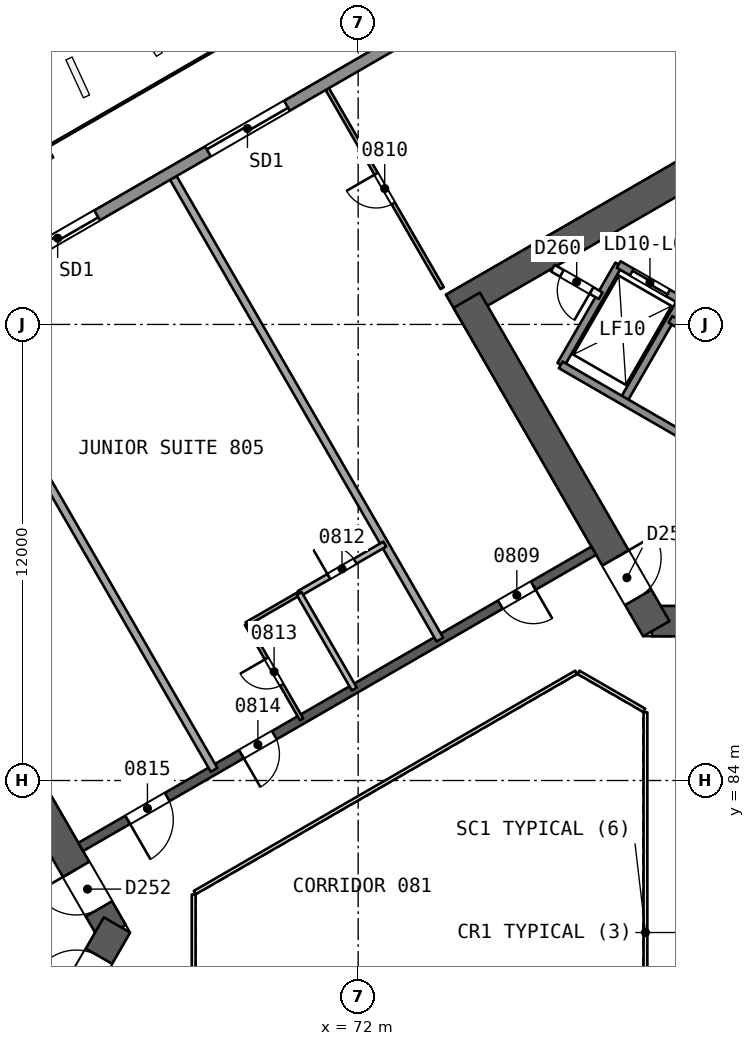
"""IFC4 building model, lengths in metres.
Left out: names, types, materials, properties, quantities, classifications, styles, units other than length and angle.
Written with IfcOpenShell. Run it as: python <this file> out.ifc"""

import sys

from ifc_helpers import new_model, si_unit, direction, frame, frame_2d, origin, origin_2d, place, context, subcontext, project, spatial, rectangle, extrude, element, fill, save


model = new_model("IFC4")
c1 = context("Model", 3, precision=1e-05, world=origin(), true_north=direction((0.0, 1.0)))
c2 = subcontext(c1, "Body", "Model", "MODEL_VIEW")
j1 = project(units=[si_unit("LENGTHUNIT", "METRE"), si_unit("PLANEANGLEUNIT", "RADIAN")], contexts=[c1])
p1 = place(None, origin())
s1 = spatial("IfcSite", under=j1, at=p1, CompositionType="ELEMENT")
p2 = place(p1, origin())
s2 = spatial("IfcBuilding", under=s1, at=p2, CompositionType="ELEMENT")
p3 = place(p2, frame((0.0, 0.0, 41.1)))
s3 = spatial("IfcBuildingStorey", under=s2, at=p3, CompositionType="ELEMENT", Elevation=41.1)
p4 = place(p3, frame((65.538, 80.0, 0.0), z_axis=(0.0, 0.0, 1.0), x_axis=(-0.49999662545, 0.866027352073, 0.0)))
e1 = element("IfcWall", 1, at=p4, inside=s3, PredefinedType="SHEAR", context=c2, shape_type="SweptSolid", body=[
    extrude(rectangle(XDim=10.149, YDim=0.8, at=frame_2d((5.074, 0.0))), origin(), (0.0, 0.0, 1.0), 3.7),
])
p5 = place(p4, frame((0.719, 0.0, 0.0)))
e2 = element("IfcOpeningElement", 2, at=p5, cuts=e1, PredefinedType="OPENING", context=c2, shape_type="SweptSolid", body=[
    extrude(rectangle(XDim=1.2, YDim=2.1, at=frame_2d((0.6, 1.05))), frame((0.0, 0.411, 0.0), z_axis=(0.0, -1.0, 0.0), x_axis=(1.0, 0.0, 0.0)), (0.0, 0.0, 1.0), 0.821),
])
p6 = place(p3, frame((60.664, 71.557, 0.0), z_axis=(0.0, 0.0, 1.0), x_axis=(0.50000409368, 0.866023040284, 0.0)))
e3 = element("IfcWall", 3, at=p6, inside=s3, PredefinedType="SHEAR", context=c2, shape_type="SweptSolid", body=[
    extrude(rectangle(XDim=9.98, YDim=0.8, at=frame_2d((4.99, 0.0))), origin(), (0.0, 0.0, 1.0), 3.7),
])
p7 = place(p6, frame((7.83, 0.0, 0.0)))
e4 = element("IfcOpeningElement", 4, at=p7, cuts=e3, PredefinedType="OPENING", context=c2, shape_type="SweptSolid", body=[
    extrude(rectangle(XDim=1.2, YDim=2.1, at=frame_2d((0.6, 1.05))), frame((0.0, 0.411, 0.0), z_axis=(0.0, -1.0, 0.0), x_axis=(1.0, 0.0, 0.0)), (0.0, 0.0, 1.0), 0.821),
])
p8 = place(p3, frame((79.731, 88.194, 0.0), z_axis=(0.0, 0.0, 1.0), x_axis=(1.0, 0.0, 0.0)))
e5 = element("IfcWall", 5, at=p8, inside=s3, PredefinedType="SHEAR", context=c2, shape_type="SweptSolid", body=[
    extrude(rectangle(XDim=10.149, YDim=0.8, at=frame_2d((5.074, 0.0))), origin(), (0.0, 0.0, 1.0), 3.7),
])
p9 = place(p8, frame((0.719, 0.0, 0.0)))
e6 = element("IfcOpeningElement", 6, at=p9, cuts=e5, PredefinedType="OPENING", context=c2, shape_type="SweptSolid", body=[
    extrude(rectangle(XDim=1.2, YDim=2.1, at=frame_2d((0.6, 1.05))), frame((0.0, 0.411, 0.0), z_axis=(0.0, -1.0, 0.0), x_axis=(1.0, 0.0, 0.0)), (0.0, 0.0, 1.0), 0.821),
])
p10 = place(p3, frame((86.723, 103.488, 0.0), z_axis=(0.0, 0.0, 1.0), x_axis=(-0.866032504327, -0.499987701298, 0.0)))
e7 = element("IfcWall", 7, at=p10, inside=s3, PredefinedType="SHEAR", context=c2, shape_type="SweptSolid", body=[
    extrude(rectangle(XDim=14.102, YDim=0.8, at=frame_2d((7.051, 0.0))), origin(), (0.0, 0.0, 1.0), 3.7),
])
p11 = place(p3, frame((74.856, 96.637, 0.0), z_axis=(0.0, 0.0, 1.0), x_axis=(0.499993500917, -0.866029155999, 0.0)))
e8 = element("IfcWall", 8, at=p11, inside=s3, PredefinedType="SHEAR", context=c2, shape_type="SweptSolid", body=[
    extrude(rectangle(XDim=9.98, YDim=0.8, at=frame_2d((4.99, 0.0))), origin(), (0.0, 0.0, 1.0), 3.7),
])
p12 = place(p11, frame((7.83, 0.0, 0.0)))
e9 = element("IfcOpeningElement", 9, at=p12, cuts=e8, PredefinedType="OPENING", context=c2, shape_type="SweptSolid", body=[
    extrude(rectangle(XDim=1.2, YDim=2.1, at=frame_2d((0.6, 1.05))), frame((0.0, 0.411, 0.0), z_axis=(0.0, -1.0, 0.0), x_axis=(1.0, 0.0, 0.0)), (0.0, 0.0, 1.0), 0.821),
])
p13 = place(p3, frame((78.2, 90.046, 0.0), z_axis=(0.0, 0.0, 1.0), x_axis=(-0.866026492143, -0.499998114903, 0.0)))
e10 = element("IfcWall", 10, at=p13, inside=s3, PredefinedType="SHEAR", context=c2, shape_type="SweptSolid", body=[
    extrude(rectangle(XDim=15.588, YDim=0.25, at=frame_2d((7.794, 0.0))), origin(), (0.0, 0.0, 1.0), 3.2),
])
p14 = place(p13, frame((1.838, 0.0, 0.0)))
e11 = element("IfcOpeningElement", 11, at=p14, cuts=e10, PredefinedType="OPENING", context=c2, shape_type="SweptSolid", body=[
    extrude(rectangle(XDim=1.0, YDim=2.1, at=frame_2d((0.5, 1.05))), frame((0.0, 0.135, 0.0), z_axis=(0.0, -1.0, 0.0), x_axis=(1.0, 0.0, 0.0)), (0.0, 0.0, 1.0), 0.271),
])
p15 = place(p13, frame((9.706, 0.0, 0.0)))
e12 = element("IfcOpeningElement", 12, at=p15, cuts=e10, PredefinedType="OPENING", context=c2, shape_type="SweptSolid", body=[
    extrude(rectangle(XDim=1.0, YDim=2.1, at=frame_2d((0.5, 1.05))), frame((0.0, 0.135, 0.0), z_axis=(0.0, -1.0, 0.0), x_axis=(1.0, 0.0, 0.0)), (0.0, 0.0, 1.0), 0.271),
])
p16 = place(p13, frame((12.962, 0.0, 0.0)))
e13 = element("IfcOpeningElement", 13, at=p16, cuts=e10, PredefinedType="OPENING", context=c2, shape_type="SweptSolid", body=[
    extrude(rectangle(XDim=1.2, YDim=2.4, at=frame_2d((0.6, 1.2))), frame((0.0, 0.135, 0.0), z_axis=(0.0, -1.0, 0.0), x_axis=(1.0, 0.0, 0.0)), (0.0, 0.0, 1.0), 0.271),
])
p17 = place(p3, frame((63.087, 100.634, 0.0), z_axis=(0.010093620709, -0.017482414954, 0.999796221231), x_axis=(0.866020200589, 0.50000901209, 8.5616e-08)))
e14 = element("IfcColumn", 14, at=p17, inside=s3, PredefinedType="COLUMN", context=c2, shape_type="SweptSolid", body=[
    extrude(rectangle(XDim=1.2, YDim=1.2, at=origin_2d()), origin(), (0.0, 0.0, 1.0), 3.701),
])
p18 = place(p3, frame((74.21, 96.956, 0.0), z_axis=(0.0, 0.0, 1.0), x_axis=(-0.499985689571, 0.866033665757, 0.0)))
e15 = element("IfcWall", 15, at=p18, inside=s3, PredefinedType="PARTITIONING", context=c2, shape_type="SweptSolid", body=[
    extrude(rectangle(XDim=6.048, YDim=0.1, at=frame_2d((3.024, 0.0))), origin(), (0.0, 0.0, 1.0), 3.2),
])
p19 = place(p18, frame((2.574, 0.0, 0.0)))
e16 = element("IfcOpeningElement", 16, at=p19, cuts=e15, PredefinedType="OPENING", context=c2, shape_type="SweptSolid", body=[
    extrude(rectangle(XDim=0.9, YDim=2.1, at=frame_2d((0.45, 1.05))), frame((0.0, 0.061, 0.0), z_axis=(0.0, -1.0, 0.0), x_axis=(1.0, 0.0, 0.0)), (0.0, 0.0, 1.0), 0.121),
])
p20 = place(p3, frame((67.136, 99.855, 0.0), z_axis=(0.0, 0.0, 1.0), x_axis=(0.499997162821, -0.866027041824, 0.0)))
e17 = element("IfcWall", 17, at=p20, inside=s3, PredefinedType="PARTITIONING", context=c2, shape_type="SweptSolid", body=[
    extrude(rectangle(XDim=14.027, YDim=0.2, at=frame_2d((7.013, 0.0))), origin(), (0.0, 0.0, 1.0), 3.2),
])
p21 = place(p3, frame((70.448, 88.919, 0.0), z_axis=(0.0, 0.0, 1.0), x_axis=(0.866062058628, 0.499936506574, 0.0)))
e18 = element("IfcWall", 18, at=p21, inside=s3, PredefinedType="PARTITIONING", context=c2, shape_type="SweptSolid", body=[
    extrude(rectangle(XDim=2.6, YDim=0.15, at=frame_2d((1.3, 0.0))), origin(), (0.0, 0.0, 1.0), 3.2),
])
p22 = place(p21, frame((0.9, 0.0, 0.0)))
e19 = element("IfcOpeningElement", 19, at=p22, cuts=e18, PredefinedType="OPENING", context=c2, shape_type="SweptSolid", body=[
    extrude(rectangle(XDim=0.8, YDim=2.1, at=frame_2d((0.4, 1.05))), frame((0.0, 0.085, 0.0), z_axis=(0.0, -1.0, 0.0), x_axis=(1.0, 0.0, 0.0)), (0.0, 0.0, 1.0), 0.171),
])
p23 = place(p3, frame((70.513, 85.608, 0.0), z_axis=(0.0, 0.0, 1.0), x_axis=(-0.499987231761, 0.866032775405, 0.0)))
e20 = element("IfcWall", 20, at=p23, inside=s3, PredefinedType="PARTITIONING", context=c2, shape_type="SweptSolid", body=[
    extrude(rectangle(XDim=2.9, YDim=0.1, at=frame_2d((1.45, 0.0))), origin(), (0.0, 0.0, 1.0), 3.2),
])
p24 = place(p23, frame((1.05, 0.0, 0.0)))
e21 = element("IfcOpeningElement", 21, at=p24, cuts=e20, PredefinedType="OPENING", context=c2, shape_type="SweptSolid", body=[
    extrude(rectangle(XDim=0.8, YDim=2.1, at=frame_2d((0.4, 1.05))), frame((0.0, 0.061, 0.0), z_axis=(0.0, -1.0, 0.0), x_axis=(1.0, 0.0, 0.0)), (0.0, 0.0, 1.0), 0.121),
])
p25 = place(p3, frame((69.063, 88.119, 0.0), z_axis=(0.0, 0.0, 1.0), x_axis=(0.865989903783, 0.500061482766, 0.0)))
e22 = element("IfcWall", 22, at=p25, inside=s3, PredefinedType="PARTITIONING", context=c2, shape_type="SweptSolid", body=[
    extrude(rectangle(XDim=1.6, YDim=0.1, at=frame_2d((0.8, 0.0))), origin(), (0.0, 0.0, 1.0), 3.2),
])
p26 = place(p3, frame((61.197, 96.426, 0.0), z_axis=(0.0, 0.0, 1.0), x_axis=(0.499997162821, -0.866027041824, 0.0)))
e23 = element("IfcWall", 23, at=p26, inside=s3, PredefinedType="PARTITIONING", context=c2, shape_type="SweptSolid", body=[
    extrude(rectangle(XDim=14.027, YDim=0.2, at=frame_2d((7.013, 0.0))), origin(), (0.0, 0.0, 1.0), 3.2),
])
p27 = place(p3, frame((70.448, 88.919, 0.0), z_axis=(0.0, 0.0, 1.0), x_axis=(0.50005036918, -0.865996321171, 0.0)))
e24 = element("IfcWall", 24, at=p27, inside=s3, PredefinedType="PARTITIONING", context=c2, shape_type="SweptSolid", body=[
    extrude(rectangle(XDim=2.9, YDim=0.15, at=frame_2d((1.45, 0.0))), origin(), (0.0, 0.0, 1.0), 3.2),
])
p28 = place(p3, frame((37.87, 83.13, 0.0), z_axis=(0.0, 0.0, 1.0), x_axis=(0.866026630825, 0.499997874697, 0.0)))
e25 = element("IfcWall", 25, at=p28, inside=s3, PredefinedType="SOLIDWALL", context=c2, shape_type="SweptSolid", body=[
    extrude(rectangle(XDim=61.18, YDim=0.3, at=frame_2d((30.59, 0.0))), origin(), (0.0, 0.0, 1.0), 3.2),
])
p29 = place(p28, frame((12.181, 0.0, 0.0)))
e26 = element("IfcOpeningElement", 26, at=p29, cuts=e25, PredefinedType="OPENING", context=c2, shape_type="SweptSolid", body=[
    extrude(rectangle(XDim=2.4, YDim=2.4, at=frame_2d((1.2, 1.2))), frame((0.0, 0.161, 0.0), z_axis=(0.0, -1.0, 0.0), x_axis=(1.0, 0.0, 0.0)), (0.0, 0.0, 1.0), 0.321),
])
p30 = place(p28, frame((34.846, 0.0, 0.0)))
e27 = element("IfcOpeningElement", 27, at=p30, cuts=e25, PredefinedType="OPENING", context=c2, shape_type="SweptSolid", body=[
    extrude(rectangle(XDim=2.4, YDim=2.4, at=frame_2d((1.2, 1.2))), frame((0.0, 0.161, 0.0), z_axis=(0.0, -1.0, 0.0), x_axis=(1.0, 0.0, 0.0)), (0.0, 0.0, 1.0), 0.321),
])
p31 = place(p28, frame((47.439, 0.0, 0.0)))
e28 = element("IfcOpeningElement", 28, at=p31, cuts=e25, PredefinedType="OPENING", context=c2, shape_type="SweptSolid", body=[
    extrude(rectangle(XDim=2.4, YDim=2.4, at=frame_2d((1.2, 1.2))), frame((0.0, 0.161, 0.0), z_axis=(0.0, -1.0, 0.0), x_axis=(1.0, 0.0, 0.0)), (0.0, 0.0, 1.0), 0.321),
])
p32 = place(p28, frame((29.078, 0.0, 0.0)))
e29 = element("IfcOpeningElement", 29, at=p32, cuts=e25, PredefinedType="OPENING", context=c2, shape_type="SweptSolid", body=[
    extrude(rectangle(XDim=2.4, YDim=2.4, at=frame_2d((1.2, 1.2))), frame((0.0, 0.161, 0.0), z_axis=(0.0, -1.0, 0.0), x_axis=(1.0, 0.0, 0.0)), (0.0, 0.0, 1.0), 0.321),
])
for number, where, z_axis, x_axis in (
    (30, (78.976, 93.986, 0.0), (0.0, 0.0, 1.0), (0.5, 0.866, 0.0)),
    (31, (77.33, 94.936, 0.0), (0.0, 0.0, 1.0), (0.5, 0.866, 0.0)),
):
    element("IfcWall", number, at=place(p3, frame(where, z_axis=z_axis, x_axis=x_axis)), inside=s3, PredefinedType="SOLIDWALL", context=c2, shape_type="SweptSolid", body=[
        extrude(rectangle(XDim=3.05, YDim=0.2, at=frame_2d((1.525, 0.0))), origin(), (0.0, 0.0, 1.0), 3.2),
    ])
p33 = place(p3, frame((86.77, 89.486, 0.0), z_axis=(0.0, 0.0, 1.0), x_axis=(-0.86601811187, 0.500012629753, 0.0)))
e32 = element("IfcWall", 32, at=p33, inside=s3, PredefinedType="SOLIDWALL", context=c2, shape_type="SweptSolid", body=[
    extrude(rectangle(XDim=10.9, YDim=0.2, at=frame_2d((5.45, 0.0))), origin(), (0.0, 0.0, 1.0), 3.2),
])
p34 = place(p3, frame((78.38, 96.755, 0.0), z_axis=(0.0, 0.0, 1.0), x_axis=(-0.866003949776, 0.500037157592, 0.0)))
e33 = element("IfcWall", 33, at=p34, inside=s3, PredefinedType="PARTITIONING", context=c2, shape_type="SweptSolid", body=[
    extrude(rectangle(XDim=1.455, YDim=0.2, at=frame_2d((0.728, 0.0))), origin(), (0.0, 0.0, 1.0), 3.2),
])
p35 = place(p34, frame((0.278, 0.0, 0.0)))
e34 = element("IfcOpeningElement", 34, at=p35, cuts=e33, PredefinedType="OPENING", context=c2, shape_type="SweptSolid", body=[
    extrude(rectangle(XDim=0.9, YDim=2.1, at=frame_2d((0.45, 1.05))), frame((0.0, 0.11, 0.0), z_axis=(0.0, -1.0, 0.0), x_axis=(1.0, 0.0, 0.0)), (0.0, 0.0, 1.0), 0.221),
])
p36 = place(p3, frame((88.01, 91.634, 0.0), z_axis=(0.0, 0.0, 1.0), x_axis=(-0.866024315419, 0.5000018851, 0.0)))
e35 = element("IfcWall", 35, at=p36, inside=s3, PredefinedType="SOLIDWALL", context=c2, shape_type="SweptSolid", body=[
    extrude(rectangle(XDim=9.0, YDim=0.2, at=frame_2d((4.5, 0.0))), origin(), (0.0, 0.0, 1.0), 3.2),
])
p37 = place(p3, frame((80.5, 96.627, 0.0), z_axis=(0.0, 0.0, 1.0), x_axis=(-0.86601224135, 0.500022797313, 0.0)))
e36 = element("IfcWall", 36, at=p37, inside=s3, PredefinedType="SOLIDWALL", context=c2, shape_type="SweptSolid", body=[
    extrude(rectangle(XDim=1.9, YDim=0.2, at=frame_2d((0.95, 0.0))), origin(), (0.0, 0.0, 1.0), 3.2),
])
p38 = place(p37, frame((0.4, 0.0, 0.0)))
e37 = element("IfcOpeningElement", 37, at=p38, cuts=e36, PredefinedType="OPENING", context=c2, shape_type="SweptSolid", body=[
    extrude(rectangle(XDim=1.1, YDim=2.1, at=frame_2d((0.55, 1.05))), frame((0.0, 0.11, 0.0), z_axis=(0.0, -1.0, 0.0), x_axis=(1.0, 0.0, 0.0)), (0.0, 0.0, 1.0), 0.221),
])
p39 = place(p3, frame((79.56, 74.206, 0.0), z_axis=(0.0, 0.0, 1.0), x_axis=(0.0, 1.0, 0.0)))
e38 = element("IfcWall", 38, at=p39, inside=s3, PredefinedType="PARTITIONING", context=c2, shape_type="SweptSolid", body=[
    extrude(rectangle(XDim=11.588, YDim=0.1, at=frame_2d((5.794, 0.0))), origin(), (0.0, 0.0, 1.0), 3.2),
])
p40 = place(p3, frame((79.53, 85.846, 0.0), z_axis=(0.0, 0.0, 1.0), x_axis=(-0.866041268327, 0.499972520799, 0.0)))
e39 = element("IfcWall", 39, at=p40, inside=s3, PredefinedType="PARTITIONING", context=c2, shape_type="SweptSolid", body=[
    extrude(rectangle(XDim=2.0, YDim=0.1, at=frame_2d((1.0, 0.0))), origin(), (0.0, 0.0, 1.0), 3.2),
])
p41 = place(p3, frame((77.738, 86.846, 0.0), z_axis=(0.0, 0.0, 1.0), x_axis=(-0.866026658274, -0.499997827154, 0.0)))
e40 = element("IfcWall", 40, at=p41, inside=s3, PredefinedType="PARTITIONING", context=c2, shape_type="SweptSolid", body=[
    extrude(rectangle(XDim=11.588, YDim=0.1, at=frame_2d((5.794, 0.0))), origin(), (0.0, 0.0, 1.0), 3.2),
])
p42 = place(p3, frame((67.672, 81.0, 0.0), z_axis=(0.0, 0.0, 1.0), x_axis=(0.0, -1.0, 0.0)))
e41 = element("IfcWall", 41, at=p42, inside=s3, PredefinedType="PARTITIONING", context=c2, shape_type="SweptSolid", body=[
    extrude(rectangle(XDim=2.0, YDim=0.1, at=frame_2d((1.0, 0.0))), origin(), (0.0, 0.0, 1.0), 3.2),
])
p43 = place(p14, origin())
e42 = element("IfcDoor", 42, at=p43, inside=s3, OperationType="SINGLE_SWING_LEFT", PredefinedType="NOTDEFINED", context=c2, shape_type="SweptSolid", body=[
    extrude(rectangle(XDim=1.0, YDim=2.1, at=frame_2d((0.5, 1.05))), frame((0.0, 0.025, 0.0), z_axis=(0.0, -1.0, 0.0), x_axis=(1.0, 0.0, 0.0)), (0.0, 0.0, 1.0), 0.05),
])
fill(e11, e42)
p44 = place(p19, origin())
e43 = element("IfcDoor", 43, at=p44, inside=s3, OperationType="SINGLE_SWING_RIGHT", PredefinedType="NOTDEFINED", context=c2, shape_type="SweptSolid", body=[
    extrude(rectangle(XDim=0.9, YDim=2.1, at=frame_2d((0.45, 1.05))), frame((0.0, 0.025, 0.0), z_axis=(0.0, -1.0, 0.0), x_axis=(1.0, 0.0, 0.0)), (0.0, 0.0, 1.0), 0.05),
])
fill(e16, e43)
p45 = place(p22, origin())
e44 = element("IfcDoor", 44, at=p45, inside=s3, OperationType="SINGLE_SWING_LEFT", PredefinedType="NOTDEFINED", context=c2, shape_type="SweptSolid", body=[
    extrude(rectangle(XDim=0.8, YDim=2.1, at=frame_2d((0.4, 1.05))), frame((0.0, 0.025, 0.0), z_axis=(0.0, -1.0, 0.0), x_axis=(1.0, 0.0, 0.0)), (0.0, 0.0, 1.0), 0.05),
])
fill(e19, e44)
p46 = place(p24, origin())
e45 = element("IfcDoor", 45, at=p46, inside=s3, OperationType="SINGLE_SWING_RIGHT", PredefinedType="NOTDEFINED", context=c2, shape_type="SweptSolid", body=[
    extrude(rectangle(XDim=0.8, YDim=2.1, at=frame_2d((0.4, 1.05))), frame((0.0, 0.025, 0.0), z_axis=(0.0, -1.0, 0.0), x_axis=(1.0, 0.0, 0.0)), (0.0, 0.0, 1.0), 0.05),
])
fill(e21, e45)
p47 = place(p15, origin())
e46 = element("IfcDoor", 46, at=p47, inside=s3, OperationType="SINGLE_SWING_RIGHT", PredefinedType="NOTDEFINED", context=c2, shape_type="SweptSolid", body=[
    extrude(rectangle(XDim=1.0, YDim=2.1, at=frame_2d((0.5, 1.05))), frame((0.0, 0.025, 0.0), z_axis=(0.0, -1.0, 0.0), x_axis=(1.0, 0.0, 0.0)), (0.0, 0.0, 1.0), 0.05),
])
fill(e12, e46)
p48 = place(p16, origin())
e47 = element("IfcDoor", 47, at=p48, inside=s3, OperationType="SINGLE_SWING_RIGHT", PredefinedType="NOTDEFINED", context=c2, shape_type="SweptSolid", body=[
    extrude(rectangle(XDim=1.2, YDim=2.4, at=frame_2d((0.6, 1.2))), frame((0.0, 0.025, 0.0), z_axis=(0.0, -1.0, 0.0), x_axis=(1.0, 0.0, 0.0)), (0.0, 0.0, 1.0), 0.05),
])
fill(e13, e47)
p49 = place(p30, origin())
e48 = element("IfcDoor", 48, at=p49, inside=s3, OperationType="SLIDING_TO_RIGHT", PredefinedType="NOTDEFINED", context=c2, shape_type="SweptSolid", body=[
    extrude(rectangle(XDim=2.4, YDim=2.4, at=frame_2d((1.2, 1.2))), frame((0.0, 0.025, 0.0), z_axis=(0.0, -1.0, 0.0), x_axis=(1.0, 0.0, 0.0)), (0.0, 0.0, 1.0), 0.05),
])
fill(e27, e48)
p50 = place(p32, origin())
e49 = element("IfcDoor", 49, at=p50, inside=s3, OperationType="SLIDING_TO_RIGHT", PredefinedType="NOTDEFINED", context=c2, shape_type="SweptSolid", body=[
    extrude(rectangle(XDim=2.4, YDim=2.4, at=frame_2d((1.2, 1.2))), frame((0.0, 0.025, 0.0), z_axis=(0.0, -1.0, 0.0), x_axis=(1.0, 0.0, 0.0)), (0.0, 0.0, 1.0), 0.05),
])
fill(e29, e49)
p51 = place(p5, origin())
e50 = element("IfcDoor", 50, at=p51, inside=s3, OperationType="SINGLE_SWING_RIGHT", PredefinedType="NOTDEFINED", context=c2, shape_type="SweptSolid", body=[
    extrude(rectangle(XDim=1.2, YDim=2.1, at=frame_2d((0.6, 1.05))), frame((0.0, 0.025, 0.0), z_axis=(0.0, -1.0, 0.0), x_axis=(1.0, 0.0, 0.0)), (0.0, 0.0, 1.0), 0.05),
])
fill(e2, e50)
p52 = place(p7, origin())
e51 = element("IfcDoor", 51, at=p52, inside=s3, OperationType="SINGLE_SWING_LEFT", PredefinedType="NOTDEFINED", context=c2, shape_type="SweptSolid", body=[
    extrude(rectangle(XDim=1.2, YDim=2.1, at=frame_2d((0.6, 1.05))), frame((0.0, 0.025, 0.0), z_axis=(0.0, -1.0, 0.0), x_axis=(1.0, 0.0, 0.0)), (0.0, 0.0, 1.0), 0.05),
])
fill(e4, e51)
p53 = place(p12, origin())
e52 = element("IfcDoor", 52, at=p53, inside=s3, OperationType="SINGLE_SWING_LEFT", PredefinedType="NOTDEFINED", context=c2, shape_type="SweptSolid", body=[
    extrude(rectangle(XDim=1.2, YDim=2.1, at=frame_2d((0.6, 1.05))), frame((0.0, 0.025, 0.0), z_axis=(0.0, -1.0, 0.0), x_axis=(1.0, 0.0, 0.0)), (0.0, 0.0, 1.0), 0.05),
])
fill(e9, e52)
p54 = place(p38, origin())
e53 = element("IfcDoor", 53, at=p54, inside=s3, OperationType="SLIDING_TO_RIGHT", PredefinedType="NOTDEFINED", context=c2, shape_type="SweptSolid", body=[
    extrude(rectangle(XDim=1.1, YDim=2.1, at=frame_2d((0.55, 1.05))), frame((0.0, 0.025, 0.0), z_axis=(0.0, -1.0, 0.0), x_axis=(1.0, 0.0, 0.0)), (0.0, 0.0, 1.0), 0.05),
])
fill(e37, e53)
p55 = place(p35, origin())
e54 = element("IfcDoor", 54, at=p55, inside=s3, OperationType="SINGLE_SWING_LEFT", PredefinedType="NOTDEFINED", context=c2, shape_type="SweptSolid", body=[
    extrude(rectangle(XDim=0.9, YDim=2.1, at=frame_2d((0.45, 1.05))), frame((0.0, 0.025, 0.0), z_axis=(0.0, -1.0, 0.0), x_axis=(1.0, 0.0, 0.0)), (0.0, 0.0, 1.0), 0.05),
])
fill(e34, e54)
save(model, sys.argv[1])
